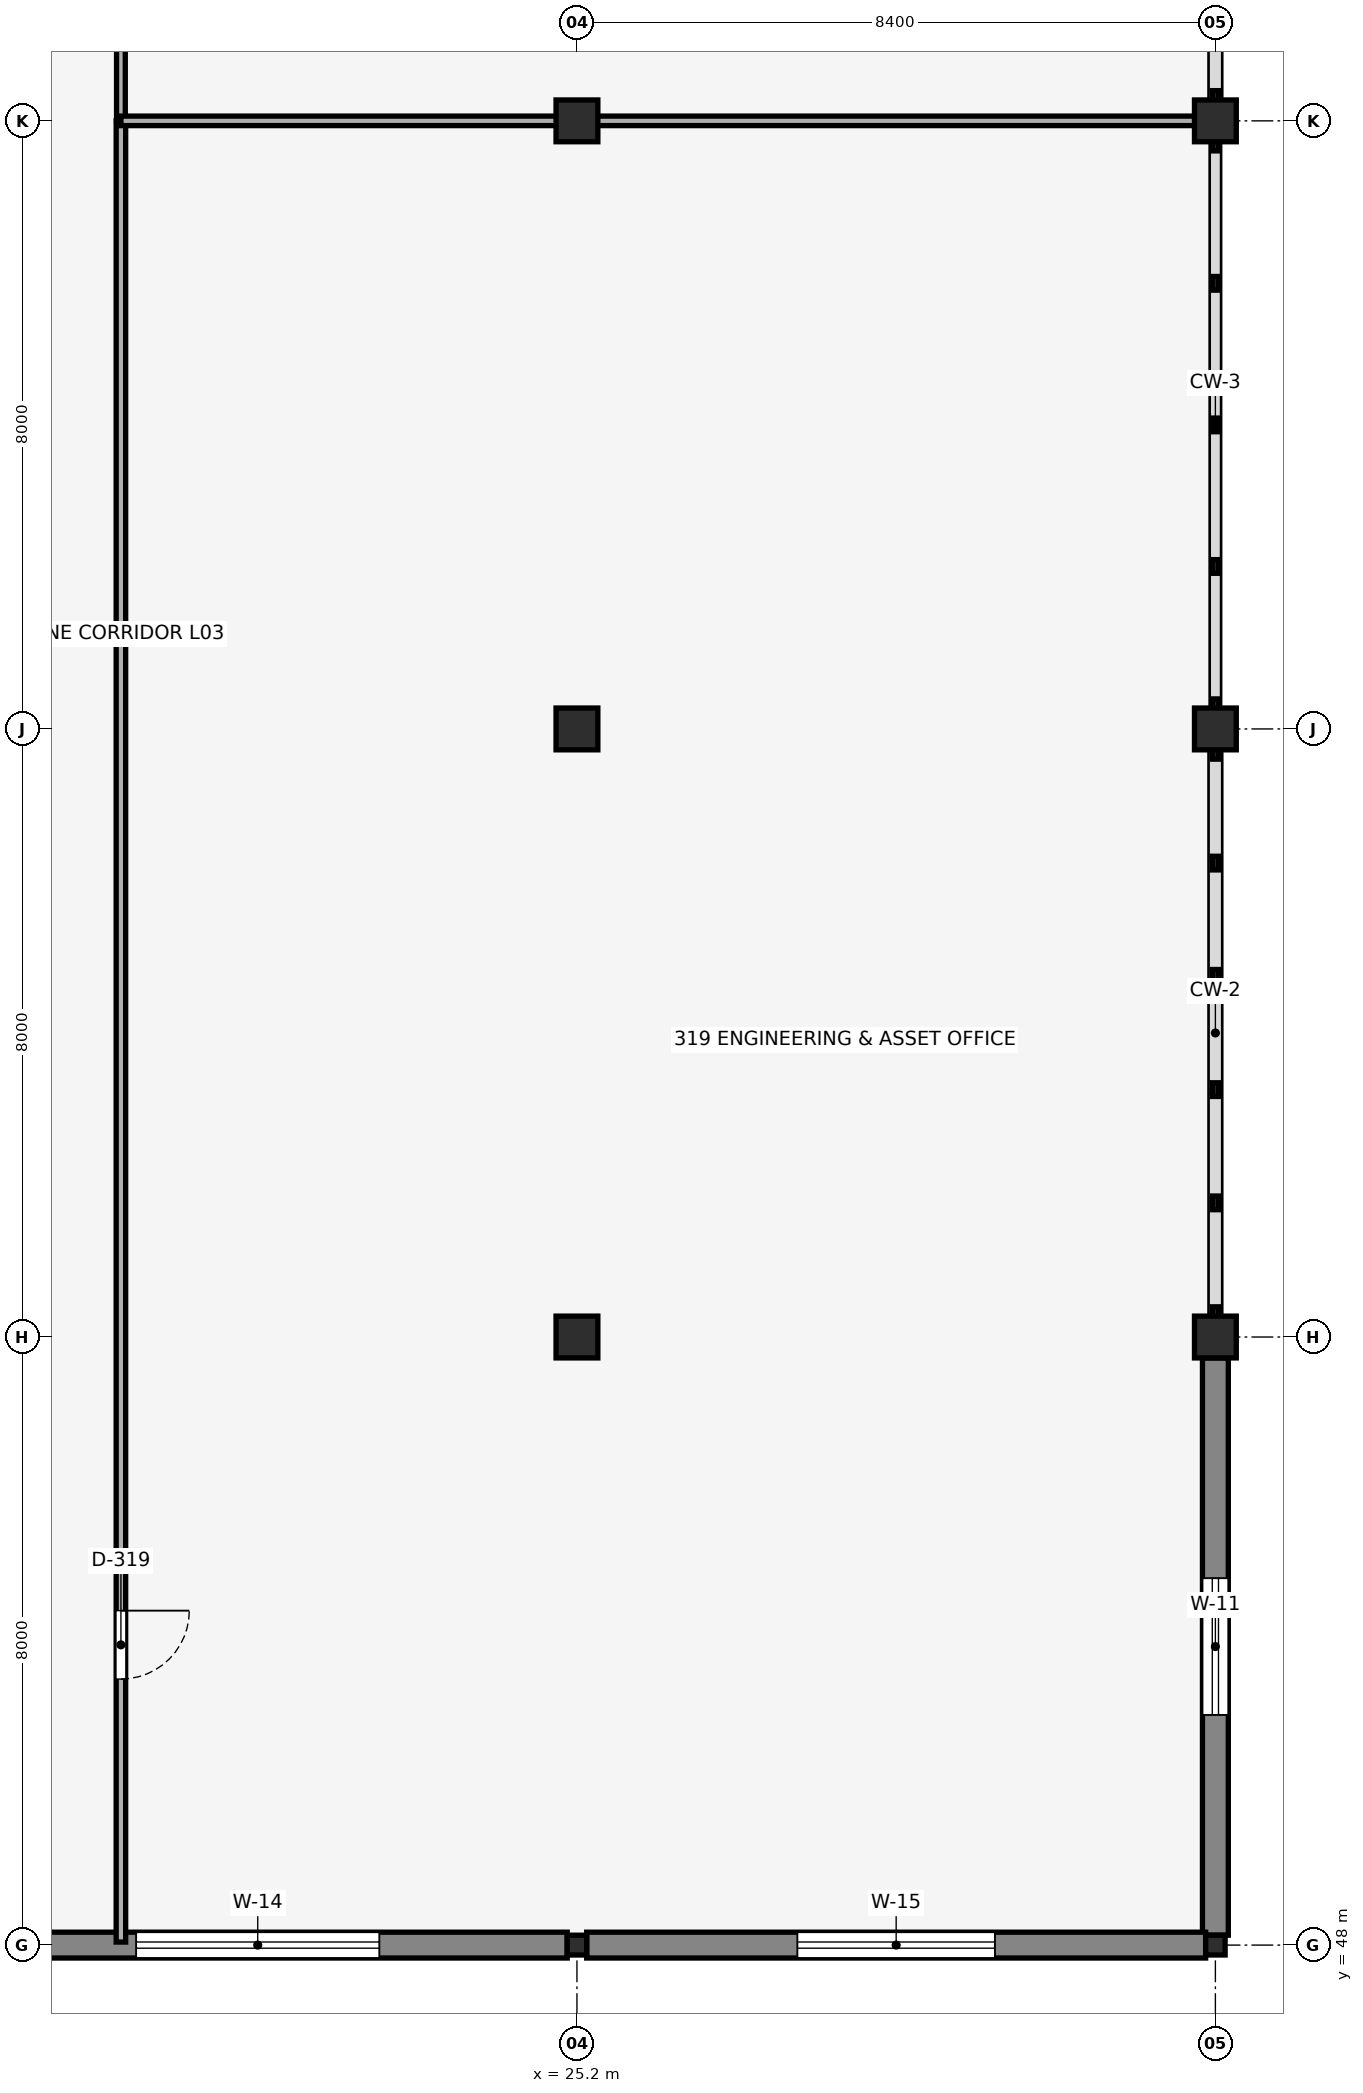
"""IFC4 building model, lengths in metres.
Left out: names, types, materials, properties, quantities, classifications, styles, units other than length and angle.
Written with IfcOpenShell. Run it as: python <this file> out.ifc"""

import sys

from ifc_helpers import new_model, si_unit, direction, frame, frame_2d, origin, origin_2d, place, context, subcontext, project, spatial, rectangle, i_section, extrude, element, fill, save


model = new_model("IFC4")
c1 = context("Model", 3, precision=1e-05, world=origin(), true_north=direction((0.0, 1.0)))
c2 = subcontext(c1, "Body", "Model", "MODEL_VIEW")
j1 = project(units=[si_unit("LENGTHUNIT", "METRE"), si_unit("PLANEANGLEUNIT", "RADIAN")], contexts=[c1])
p1 = place(None, origin())
s1 = spatial("IfcSite", under=j1, at=p1, CompositionType="ELEMENT")
p2 = place(p1, origin())
s2 = spatial("IfcBuilding", under=s1, at=p2, CompositionType="ELEMENT")
p3 = place(p2, frame((0.0, 0.0, 13.36)))
s3 = spatial("IfcBuildingStorey", under=s2, at=p3, CompositionType="ELEMENT", Elevation=13.36)
p4 = place(p3, frame((25.2, 48.0, 0.0), z_axis=(0.0, 0.0, 1.0), x_axis=(1.0, 0.0, 0.0)))
e1 = element("IfcColumn", 1, at=p4, inside=s3, PredefinedType="COLUMN", context=c2, shape_type="SweptSolid", body=[
    extrude(i_section(OverallWidth=0.256, OverallDepth=0.26, WebThickness=0.01, FlangeThickness=0.017, FilletRadius=0.013, at=origin_2d()), origin(), (0.0, 0.0, 1.0), 3.58),
])
for number, where, z_axis, x_axis in (
    (2, (25.2, 56.0, 0.0), (0.0, 0.0, 1.0), (1.0, 0.0, 0.0)),
    (3, (25.2, 64.0, 0.0), (0.0, 0.0, 1.0), (1.0, 0.0, 0.0)),
    (4, (25.2, 72.0, 0.0), (0.0, 0.0, 1.0), (1.0, 0.0, 0.0)),
):
    element("IfcColumn", number, at=place(p3, frame(where, z_axis=z_axis, x_axis=x_axis)), inside=s3, PredefinedType="COLUMN", context=c2, shape_type="SweptSolid", body=[
        extrude(rectangle(XDim=0.55, YDim=0.55, at=origin_2d()), origin(), (0.0, 0.0, 1.0), 3.58),
    ])
p5 = place(p3, frame((33.6, 48.0, 0.0), z_axis=(0.0, 0.0, 1.0), x_axis=(1.0, 0.0, 0.0)))
e5 = element("IfcColumn", 5, at=p5, inside=s3, PredefinedType="COLUMN", context=c2, shape_type="SweptSolid", body=[
    extrude(i_section(OverallWidth=0.256, OverallDepth=0.26, WebThickness=0.01, FlangeThickness=0.017, FilletRadius=0.013, at=origin_2d()), origin(), (0.0, 0.0, 1.0), 3.58),
])
for number, where, z_axis, x_axis in (
    (6, (33.6, 56.0, 0.0), (0.0, 0.0, 1.0), (1.0, 0.0, 0.0)),
    (7, (33.6, 64.0, 0.0), (0.0, 0.0, 1.0), (1.0, 0.0, 0.0)),
    (8, (33.6, 72.0, 0.0), (0.0, 0.0, 1.0), (1.0, 0.0, 0.0)),
):
    element("IfcColumn", number, at=place(p3, frame(where, z_axis=z_axis, x_axis=x_axis)), inside=s3, PredefinedType="COLUMN", context=c2, shape_type="SweptSolid", body=[
        extrude(rectangle(XDim=0.55, YDim=0.55, at=origin_2d()), origin(), (0.0, 0.0, 1.0), 3.58),
    ])
p6 = place(p3, frame((33.6, 48.13, 0.0), z_axis=(0.0, 0.0, 1.0), x_axis=(0.0, 1.0, 0.0)))
e9 = element("IfcWall", 9, at=p6, inside=s3, PredefinedType="SOLIDWALL", context=c2, shape_type="SweptSolid", body=[
    extrude(rectangle(XDim=7.595, YDim=0.34, at=frame_2d((3.797, 0.0))), origin(), (0.0, 0.0, 1.0), 3.28),
])
p7 = place(p6, frame((2.897, 0.0, 0.9), z_axis=(0.0, 0.0, 1.0), x_axis=(1.0, 0.0, 0.0)))
e10 = element("IfcOpeningElement", 10, at=p7, cuts=e9, PredefinedType="OPENING", context=c2, shape_type="SweptSolid", body=[
    extrude(rectangle(XDim=1.8, YDim=1.45, at=frame_2d((0.9, 0.725))), frame((0.0, 0.18, 0.0), z_axis=(0.0, -1.0, 0.0), x_axis=(1.0, 0.0, 0.0)), (0.0, 0.0, 1.0), 0.36),
])
p8 = place(p3, frame((16.928, 48.0, 0.0), z_axis=(0.0, 0.0, 1.0), x_axis=(1.0, 0.0, 0.0)))
e11 = element("IfcWall", 11, at=p8, inside=s3, PredefinedType="SOLIDWALL", context=c2, shape_type="SweptSolid", body=[
    extrude(rectangle(XDim=8.144, YDim=0.34, at=frame_2d((4.072, 0.0))), origin(), (0.0, 0.0, 1.0), 3.28),
])
p9 = place(p8, frame((2.472, 0.0, 1.55), z_axis=(0.0, 0.0, 1.0), x_axis=(1.0, 0.0, 0.0)))
e12 = element("IfcOpeningElement", 12, at=p9, cuts=e11, PredefinedType="OPENING", context=c2, shape_type="SweptSolid", body=[
    extrude(rectangle(XDim=3.2, YDim=0.9, at=frame_2d((1.6, 0.45))), frame((0.0, 0.18, 0.0), z_axis=(0.0, -1.0, 0.0), x_axis=(1.0, 0.0, 0.0)), (0.0, 0.0, 1.0), 0.36),
])
p10 = place(p3, frame((25.328, 48.0, 0.0), z_axis=(0.0, 0.0, 1.0), x_axis=(1.0, 0.0, 0.0)))
e13 = element("IfcWall", 13, at=p10, inside=s3, PredefinedType="SOLIDWALL", context=c2, shape_type="SweptSolid", body=[
    extrude(rectangle(XDim=8.144, YDim=0.34, at=frame_2d((4.072, 0.0))), origin(), (0.0, 0.0, 1.0), 3.28),
])
p11 = place(p10, frame((2.772, 0.0, 1.55), z_axis=(0.0, 0.0, 1.0), x_axis=(1.0, 0.0, 0.0)))
e14 = element("IfcOpeningElement", 14, at=p11, cuts=e13, PredefinedType="OPENING", context=c2, shape_type="SweptSolid", body=[
    extrude(rectangle(XDim=2.6, YDim=0.85, at=frame_2d((1.3, 0.425))), frame((0.0, 0.18, 0.0), z_axis=(0.0, -1.0, 0.0), x_axis=(1.0, 0.0, 0.0)), (0.0, 0.0, 1.0), 0.36),
])
p12 = place(p3, frame((19.2, 48.04, 0.0), z_axis=(0.0, 0.0, 1.0), x_axis=(0.0, 1.0, 0.0)))
e15 = element("IfcWall", 15, at=p12, inside=s3, PredefinedType="PARTITIONING", context=c2, shape_type="SweptSolid", body=[
    extrude(rectangle(XDim=23.96, YDim=0.125, at=frame_2d((11.98, 0.0))), origin(), (0.0, 0.0, 1.0), 3.58),
])
p13 = place(p12, frame((4.36, 0.0, 0.0), z_axis=(0.0, 0.0, 1.0), x_axis=(-1.0, 0.0, 0.0)))
e16 = element("IfcOpeningElement", 16, at=p13, cuts=e15, PredefinedType="OPENING", context=c2, shape_type="SweptSolid", body=[
    extrude(rectangle(XDim=0.9, YDim=2.1, at=frame_2d((0.45, 1.05))), frame((0.0, 0.073, 0.0), z_axis=(0.0, -1.0, 0.0), x_axis=(1.0, 0.0, 0.0)), (0.0, 0.0, 1.0), 0.145),
])
p14 = place(p3, frame((19.2, 72.0, 0.0), z_axis=(0.0, 0.0, 1.0), x_axis=(0.0, 1.0, 0.0)))
e17 = element("IfcWall", 17, at=p14, inside=s3, PredefinedType="PARTITIONING", context=c2, shape_type="SweptSolid", body=[
    extrude(rectangle(XDim=16.0, YDim=0.115, at=frame_2d((8.0, 0.0))), origin(), (0.0, 0.0, 1.0), 3.58),
])
p15 = place(p14, frame((4.52, 0.0, 0.0), z_axis=(0.0, 0.0, 1.0), x_axis=(-1.0, 0.0, 0.0)))
e18 = element("IfcOpeningElement", 18, at=p15, cuts=e17, PredefinedType="OPENING", context=c2, shape_type="SweptSolid", body=[
    extrude(rectangle(XDim=1.02, YDim=2.16, at=frame_2d((0.51, 1.08))), frame((0.0, 0.067, 0.0), z_axis=(0.0, -1.0, 0.0), x_axis=(1.0, 0.0, 0.0)), (0.0, 0.0, 1.0), 0.135),
])
p16 = place(p3, frame((19.2, 72.0, 0.0), z_axis=(0.0, 0.0, 1.0), x_axis=(1.0, 0.0, 0.0)))
e19 = element("IfcWall", 19, at=p16, inside=s3, PredefinedType="PARTITIONING", context=c2, shape_type="SweptSolid", body=[
    extrude(rectangle(XDim=5.735, YDim=0.125, at=frame_2d((2.868, 0.0))), origin(), (0.0, 0.0, 1.0), 3.123),
])
p17 = place(p3, frame((25.465, 72.0, 0.0), z_axis=(0.0, 0.0, 1.0), x_axis=(1.0, 0.0, 0.0)))
e20 = element("IfcWall", 20, at=p17, inside=s3, PredefinedType="PARTITIONING", context=c2, shape_type="SweptSolid", body=[
    extrude(rectangle(XDim=7.87, YDim=0.125, at=frame_2d((3.935, 0.0))), origin(), (0.0, 0.0, 1.0), 3.123),
])
p18 = place(p7, origin())
e21 = element("IfcWindow", 21, at=p18, inside=s3, PartitioningType="DOUBLE_PANEL_VERTICAL", PredefinedType="WINDOW", context=c2, shape_type="SweptSolid", body=[
    extrude(rectangle(XDim=1.8, YDim=1.45, at=frame_2d((0.9, 0.725))), frame((0.0, 0.03, 0.0), z_axis=(0.0, -1.0, 0.0), x_axis=(1.0, 0.0, 0.0)), (0.0, 0.0, 1.0), 0.06),
])
fill(e10, e21)
p19 = place(p9, origin())
e22 = element("IfcWindow", 22, at=p19, inside=s3, PartitioningType="TRIPLE_PANEL_HORIZONTAL", PredefinedType="WINDOW", context=c2, shape_type="SweptSolid", body=[
    extrude(rectangle(XDim=3.2, YDim=0.9, at=frame_2d((1.6, 0.45))), frame((0.0, 0.03, 0.0), z_axis=(0.0, -1.0, 0.0), x_axis=(1.0, 0.0, 0.0)), (0.0, 0.0, 1.0), 0.06),
])
fill(e12, e22)
p20 = place(p11, origin())
e23 = element("IfcWindow", 23, at=p20, inside=s3, PartitioningType="DOUBLE_PANEL_HORIZONTAL", PredefinedType="WINDOW", context=c2, shape_type="SweptSolid", body=[
    extrude(rectangle(XDim=2.6, YDim=0.85, at=frame_2d((1.3, 0.425))), frame((0.0, 0.03, 0.0), z_axis=(0.0, -1.0, 0.0), x_axis=(1.0, 0.0, 0.0)), (0.0, 0.0, 1.0), 0.06),
])
fill(e14, e23)
p21 = place(p13, origin())
e24 = element("IfcDoor", 24, at=p21, inside=s3, OperationType="SINGLE_SWING_LEFT", PredefinedType="DOOR", context=c2, shape_type="SweptSolid", body=[
    extrude(rectangle(XDim=0.9, YDim=2.1, at=frame_2d((0.45, 1.05))), frame((0.0, 0.025, 0.0), z_axis=(0.0, -1.0, 0.0), x_axis=(1.0, 0.0, 0.0)), (0.0, 0.0, 1.0), 0.05),
])
fill(e16, e24)
save(model, sys.argv[1])
